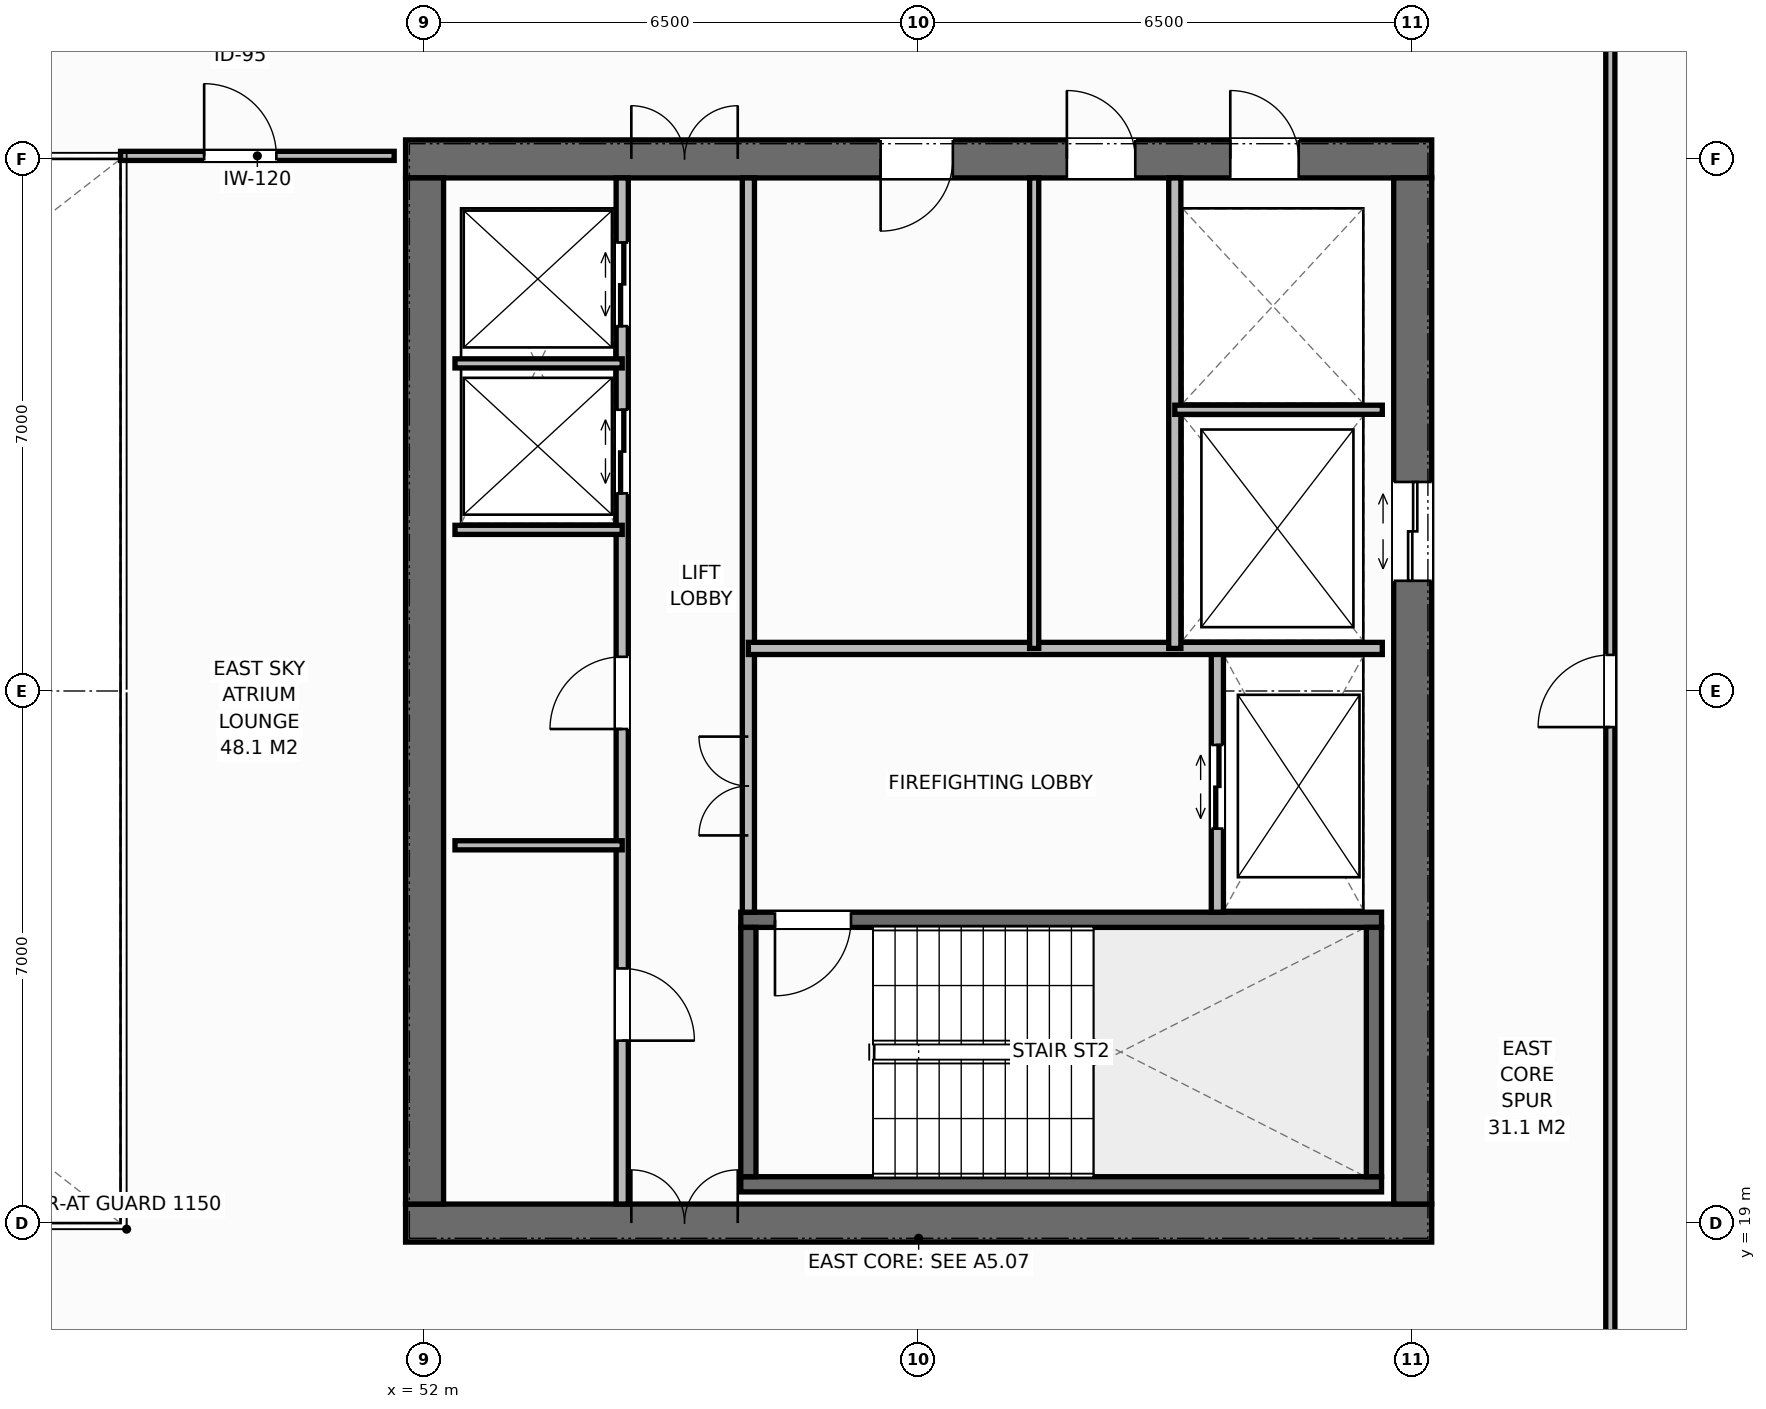
"""IFC4 building model, lengths in metres.
Left out: names, types, materials, properties, quantities, classifications, styles, units other than length and angle.
Written with IfcOpenShell. Run it as: python <this file> out.ifc"""

import sys

from ifc_helpers import new_model, si_unit, direction, frame, frame_2d, origin, place, context, subcontext, project, spatial, rectangle, extrude, element, fill, save


model = new_model("IFC4")
c1 = context("Model", 3, precision=1e-05, world=origin(), true_north=direction((0.0, 1.0)))
c2 = subcontext(c1, "Body", "Model", "MODEL_VIEW")
j1 = project(units=[si_unit("LENGTHUNIT", "METRE"), si_unit("PLANEANGLEUNIT", "RADIAN")], contexts=[c1])
p1 = place(None, origin())
s1 = spatial("IfcSite", under=j1, at=p1, CompositionType="ELEMENT")
p2 = place(p1, origin())
s2 = spatial("IfcBuilding", under=s1, at=p2, CompositionType="ELEMENT")
p3 = place(p2, frame((0.0, 0.0, 259.4)))
s3 = spatial("IfcBuildingStorey", under=s2, at=p3, CompositionType="ELEMENT", Elevation=259.4)
p4 = place(p3, frame((51.75, 19.0, 0.0), z_axis=(0.0, 0.0, 1.0), x_axis=(1.0, 0.0, 0.0)))
e1 = element("IfcWall", 1, at=p4, inside=s3, PredefinedType="SHEAR", context=c2, shape_type="SweptSolid", body=[
    extrude(rectangle(XDim=13.5, YDim=0.5, at=frame_2d((6.75, 0.0))), origin(), (0.0, 0.0, 1.0), 3.8),
])
p5 = place(p4, frame((2.97, 0.0, 0.0)))
e2 = element("IfcOpeningElement", 2, at=p5, cuts=e1, PredefinedType="OPENING", context=c2, shape_type="SweptSolid", body=[
    extrude(rectangle(XDim=1.4, YDim=2.2, at=frame_2d((0.7, 1.1))), frame((0.0, 0.26, 0.0), z_axis=(0.0, -1.0, 0.0), x_axis=(1.0, 0.0, 0.0)), (0.0, 0.0, 1.0), 0.52),
])
p6 = place(p3, frame((51.75, 33.0, 0.0), z_axis=(0.0, 0.0, 1.0), x_axis=(1.0, 0.0, 0.0)))
e3 = element("IfcWall", 3, at=p6, inside=s3, PredefinedType="SHEAR", context=c2, shape_type="SweptSolid", body=[
    extrude(rectangle(XDim=13.5, YDim=0.5, at=frame_2d((6.75, 0.0))), origin(), (0.0, 0.0, 1.0), 3.8),
])
p7 = place(p6, frame((2.97, 0.0, 0.0)))
e4 = element("IfcOpeningElement", 4, at=p7, cuts=e3, PredefinedType="OPENING", context=c2, shape_type="SweptSolid", body=[
    extrude(rectangle(XDim=1.4, YDim=2.2, at=frame_2d((0.7, 1.1))), frame((0.0, 0.26, 0.0), z_axis=(0.0, -1.0, 0.0), x_axis=(1.0, 0.0, 0.0)), (0.0, 0.0, 1.0), 0.52),
])
p8 = place(p6, frame((10.85, 0.0, 0.0)))
e5 = element("IfcOpeningElement", 5, at=p8, cuts=e3, PredefinedType="OPENING", context=c2, shape_type="SweptSolid", body=[
    extrude(rectangle(XDim=0.9, YDim=2.15, at=frame_2d((0.45, 1.075))), frame((0.0, 0.26, 0.0), z_axis=(0.0, -1.0, 0.0), x_axis=(1.0, 0.0, 0.0)), (0.0, 0.0, 1.0), 0.52),
])
p9 = place(p6, frame((6.25, 0.0, 0.0)))
e6 = element("IfcOpeningElement", 6, at=p9, cuts=e3, PredefinedType="OPENING", context=c2, shape_type="SweptSolid", body=[
    extrude(rectangle(XDim=0.95, YDim=2.15, at=frame_2d((0.475, 1.075))), frame((0.0, 0.26, 0.0), z_axis=(0.0, -1.0, 0.0), x_axis=(1.0, 0.0, 0.0)), (0.0, 0.0, 1.0), 0.52),
])
p10 = place(p6, frame((8.7, 0.0, 0.0)))
e7 = element("IfcOpeningElement", 7, at=p10, cuts=e3, PredefinedType="OPENING", context=c2, shape_type="SweptSolid", body=[
    extrude(rectangle(XDim=0.9, YDim=2.15, at=frame_2d((0.45, 1.075))), frame((0.0, 0.26, 0.0), z_axis=(0.0, -1.0, 0.0), x_axis=(1.0, 0.0, 0.0)), (0.0, 0.0, 1.0), 0.52),
])
p11 = place(p3, frame((52.0, 19.25, 0.0), z_axis=(0.0, 0.0, 1.0), x_axis=(0.0, 1.0, 0.0)))
e8 = element("IfcWall", 8, at=p11, inside=s3, PredefinedType="SHEAR", context=c2, shape_type="SweptSolid", body=[
    extrude(rectangle(XDim=13.5, YDim=0.5, at=frame_2d((6.75, 0.0))), origin(), (0.0, 0.0, 1.0), 3.8),
])
p12 = place(p3, frame((65.0, 19.25, 0.0), z_axis=(0.0, 0.0, 1.0), x_axis=(0.0, 1.0, 0.0)))
e9 = element("IfcWall", 9, at=p12, inside=s3, PredefinedType="SHEAR", context=c2, shape_type="SweptSolid", body=[
    extrude(rectangle(XDim=13.5, YDim=0.5, at=frame_2d((6.75, 0.0))), origin(), (0.0, 0.0, 1.0), 3.8),
])
p13 = place(p12, frame((8.2, 0.0, 0.0)))
e10 = element("IfcOpeningElement", 10, at=p13, cuts=e9, PredefinedType="OPENING", context=c2, shape_type="SweptSolid", body=[
    extrude(rectangle(XDim=1.3, YDim=2.2, at=frame_2d((0.65, 1.1))), frame((0.0, 0.26, 0.0), z_axis=(0.0, -1.0, 0.0), x_axis=(1.0, 0.0, 0.0)), (0.0, 0.0, 1.0), 0.52),
])
p14 = place(p3, frame((56.16, 19.51, 0.0), z_axis=(0.0, 0.0, 1.0), x_axis=(1.0, 0.0, 0.0)))
e11 = element("IfcWall", 11, at=p14, inside=s3, PredefinedType="SHEAR", context=c2, shape_type="SweptSolid", body=[
    extrude(rectangle(XDim=8.43, YDim=0.2, at=frame_2d((4.215, 0.0))), origin(), (0.0, 0.0, 1.0), 3.8),
])
p15 = place(p3, frame((56.16, 22.99, 0.0), z_axis=(0.0, 0.0, 1.0), x_axis=(1.0, 0.0, 0.0)))
e12 = element("IfcWall", 12, at=p15, inside=s3, PredefinedType="SHEAR", context=c2, shape_type="SweptSolid", body=[
    extrude(rectangle(XDim=8.43, YDim=0.2, at=frame_2d((4.215, 0.0))), origin(), (0.0, 0.0, 1.0), 3.8),
])
p16 = place(p15, frame((0.45, 0.0, 0.0)))
e13 = element("IfcOpeningElement", 13, at=p16, cuts=e12, PredefinedType="OPENING", context=c2, shape_type="SweptSolid", body=[
    extrude(rectangle(XDim=1.0, YDim=2.15, at=frame_2d((0.5, 1.075))), frame((0.0, 0.11, 0.0), z_axis=(0.0, -1.0, 0.0), x_axis=(1.0, 0.0, 0.0)), (0.0, 0.0, 1.0), 0.22),
])
for number, where, z_axis, x_axis in (
    (14, (56.26, 19.61, 0.0), (0.0, 0.0, 1.0), (0.0, 1.0, 0.0)),
    (15, (64.49, 19.61, 0.0), (0.0, 0.0, 1.0), (0.0, 1.0, 0.0)),
):
    element("IfcWall", number, at=place(p3, frame(where, z_axis=z_axis, x_axis=x_axis)), inside=s3, PredefinedType="SHEAR", context=c2, shape_type="SweptSolid", body=[
        extrude(rectangle(XDim=3.28, YDim=0.2, at=frame_2d((1.64, 0.0))), origin(), (0.0, 0.0, 1.0), 3.8),
    ])
p17 = place(p3, frame((54.6, 19.25, 0.0), z_axis=(0.0, 0.0, 1.0), x_axis=(0.0, 1.0, 0.0)))
e16 = element("IfcWall", 16, at=p17, inside=s3, PredefinedType="STANDARD", context=c2, shape_type="SweptSolid", body=[
    extrude(rectangle(XDim=13.5, YDim=0.16, at=frame_2d((6.75, 0.0))), origin(), (0.0, 0.0, 1.0), 3.588),
])
p18 = place(p17, frame((2.15, 0.0, 0.0)))
e17 = element("IfcOpeningElement", 17, at=p18, cuts=e16, PredefinedType="OPENING", context=c2, shape_type="SweptSolid", body=[
    extrude(rectangle(XDim=0.95, YDim=2.15, at=frame_2d((0.475, 1.075))), frame((0.0, 0.09, 0.0), z_axis=(0.0, -1.0, 0.0), x_axis=(1.0, 0.0, 0.0)), (0.0, 0.0, 1.0), 0.18),
])
p19 = place(p17, frame((6.25, 0.0, 0.0)))
e18 = element("IfcOpeningElement", 18, at=p19, cuts=e16, PredefinedType="OPENING", context=c2, shape_type="SweptSolid", body=[
    extrude(rectangle(XDim=0.95, YDim=2.15, at=frame_2d((0.475, 1.075))), frame((0.0, 0.09, 0.0), z_axis=(0.0, -1.0, 0.0), x_axis=(1.0, 0.0, 0.0)), (0.0, 0.0, 1.0), 0.18),
])
p20 = place(p17, frame((9.35, 0.0, 0.0)))
e19 = element("IfcOpeningElement", 19, at=p20, cuts=e16, PredefinedType="OPENING", context=c2, shape_type="SweptSolid", body=[
    extrude(rectangle(XDim=1.1, YDim=2.2, at=frame_2d((0.55, 1.1))), frame((0.0, 0.09, 0.0), z_axis=(0.0, -1.0, 0.0), x_axis=(1.0, 0.0, 0.0)), (0.0, 0.0, 1.0), 0.18),
])
p21 = place(p17, frame((11.55, 0.0, 0.0)))
e20 = element("IfcOpeningElement", 20, at=p21, cuts=e16, PredefinedType="OPENING", context=c2, shape_type="SweptSolid", body=[
    extrude(rectangle(XDim=1.1, YDim=2.2, at=frame_2d((0.55, 1.1))), frame((0.0, 0.09, 0.0), z_axis=(0.0, -1.0, 0.0), x_axis=(1.0, 0.0, 0.0)), (0.0, 0.0, 1.0), 0.18),
])
p22 = place(p3, frame((56.26, 23.09, 0.0), z_axis=(0.0, 0.0, 1.0), x_axis=(0.0, 1.0, 0.0)))
e21 = element("IfcWall", 21, at=p22, inside=s3, PredefinedType="STANDARD", context=c2, shape_type="SweptSolid", body=[
    extrude(rectangle(XDim=9.66, YDim=0.16, at=frame_2d((4.83, 0.0))), origin(), (0.0, 0.0, 1.0), 3.588),
])
p23 = place(p22, frame((1.01, 0.0, 0.0)))
e22 = element("IfcOpeningElement", 22, at=p23, cuts=e21, PredefinedType="OPENING", context=c2, shape_type="SweptSolid", body=[
    extrude(rectangle(XDim=1.3, YDim=2.2, at=frame_2d((0.65, 1.1))), frame((0.0, 0.09, 0.0), z_axis=(0.0, -1.0, 0.0), x_axis=(1.0, 0.0, 0.0)), (0.0, 0.0, 1.0), 0.18),
])
for number, where, z_axis, x_axis in (
    (23, (52.4, 23.97, 0.0), (0.0, 0.0, 1.0), (1.0, 0.0, 0.0)),
    (24, (52.4, 28.12, 0.0), (0.0, 0.0, 1.0), (1.0, 0.0, 0.0)),
    (25, (52.4, 30.31, 0.0), (0.0, 0.0, 1.0), (1.0, 0.0, 0.0)),
):
    element("IfcWall", number, at=place(p3, frame(where, z_axis=z_axis, x_axis=x_axis)), inside=s3, PredefinedType="PARTITIONING", context=c2, shape_type="SweptSolid", body=[
        extrude(rectangle(XDim=2.2, YDim=0.12, at=frame_2d((1.1, 0.0))), origin(), (0.0, 0.0, 1.0), 3.588),
    ])
p24 = place(p3, frame((62.43, 23.09, 0.0), z_axis=(0.0, 0.0, 1.0), x_axis=(0.0, 1.0, 0.0)))
e26 = element("IfcWall", 26, at=p24, inside=s3, PredefinedType="STANDARD", context=c2, shape_type="SweptSolid", body=[
    extrude(rectangle(XDim=3.47, YDim=0.16, at=frame_2d((1.735, 0.0))), origin(), (0.0, 0.0, 1.0), 3.588),
])
p25 = place(p24, frame((1.1, 0.0, 0.0)))
e27 = element("IfcOpeningElement", 27, at=p25, cuts=e26, PredefinedType="OPENING", context=c2, shape_type="SweptSolid", body=[
    extrude(rectangle(XDim=1.1, YDim=2.2, at=frame_2d((0.55, 1.1))), frame((0.0, 0.09, 0.0), z_axis=(0.0, -1.0, 0.0), x_axis=(1.0, 0.0, 0.0)), (0.0, 0.0, 1.0), 0.18),
])
p26 = place(p3, frame((56.26, 26.56, 0.0), z_axis=(0.0, 0.0, 1.0), x_axis=(1.0, 0.0, 0.0)))
e28 = element("IfcWall", 28, at=p26, inside=s3, PredefinedType="STANDARD", context=c2, shape_type="SweptSolid", body=[
    extrude(rectangle(XDim=8.34, YDim=0.16, at=frame_2d((4.17, 0.0))), origin(), (0.0, 0.0, 1.0), 3.588),
])
p27 = place(p3, frame((61.87, 26.56, 0.0), z_axis=(0.0, 0.0, 1.0), x_axis=(0.0, 1.0, 0.0)))
e29 = element("IfcWall", 29, at=p27, inside=s3, PredefinedType="STANDARD", context=c2, shape_type="SweptSolid", body=[
    extrude(rectangle(XDim=6.19, YDim=0.16, at=frame_2d((3.095, 0.0))), origin(), (0.0, 0.0, 1.0), 3.588),
])
p28 = place(p3, frame((61.87, 29.7, 0.0), z_axis=(0.0, 0.0, 1.0), x_axis=(1.0, 0.0, 0.0)))
e30 = element("IfcWall", 30, at=p28, inside=s3, PredefinedType="PARTITIONING", context=c2, shape_type="SweptSolid", body=[
    extrude(rectangle(XDim=2.73, YDim=0.12, at=frame_2d((1.365, 0.0))), origin(), (0.0, 0.0, 1.0), 3.588),
])
p29 = place(p3, frame((60.02, 26.56, 0.0), z_axis=(0.0, 0.0, 1.0), x_axis=(0.0, 1.0, 0.0)))
e31 = element("IfcWall", 31, at=p29, inside=s3, PredefinedType="PARTITIONING", context=c2, shape_type="SweptSolid", body=[
    extrude(rectangle(XDim=6.19, YDim=0.12, at=frame_2d((3.095, 0.0))), origin(), (0.0, 0.0, 1.0), 3.588),
])
p30 = place(p3, frame((48.0, 33.04, 0.0), z_axis=(0.0, 0.0, 1.0), x_axis=(1.0, 0.0, 0.0)))
e32 = element("IfcWall", 32, at=p30, inside=s3, PredefinedType="PARTITIONING", context=c2, shape_type="SweptSolid", body=[
    extrude(rectangle(XDim=3.6, YDim=0.12, at=frame_2d((1.8, 0.0))), origin(), (0.0, 0.0, 1.0), 3.328),
])
p31 = place(p30, frame((1.1, 0.0, 0.0)))
e33 = element("IfcOpeningElement", 33, at=p31, cuts=e32, PredefinedType="OPENING", context=c2, shape_type="SweptSolid", body=[
    extrude(rectangle(XDim=0.95, YDim=2.15, at=frame_2d((0.475, 1.075))), frame((0.0, 0.07, 0.0), z_axis=(0.0, -1.0, 0.0), x_axis=(1.0, 0.0, 0.0)), (0.0, 0.0, 1.0), 0.14),
])
p32 = place(p3, frame((67.6, 16.5, 0.0), z_axis=(0.0, 0.0, 1.0), x_axis=(0.0, 1.0, 0.0)))
e34 = element("IfcWall", 34, at=p32, inside=s3, PredefinedType="PARTITIONING", context=c2, shape_type="SweptSolid", body=[
    extrude(rectangle(XDim=19.0, YDim=0.12, at=frame_2d((9.5, 0.0))), origin(), (0.0, 0.0, 1.0), 3.588),
])
p33 = place(p32, frame((9.025, 0.0, 0.0)))
e35 = element("IfcOpeningElement", 35, at=p33, cuts=e34, PredefinedType="OPENING", context=c2, shape_type="SweptSolid", body=[
    extrude(rectangle(XDim=0.95, YDim=2.15, at=frame_2d((0.475, 1.075))), frame((0.0, 0.07, 0.0), z_axis=(0.0, -1.0, 0.0), x_axis=(1.0, 0.0, 0.0)), (0.0, 0.0, 1.0), 0.14),
])
p34 = place(p5, origin())
e36 = element("IfcDoor", 36, at=p34, inside=s3, OperationType="DOUBLE_DOOR_SINGLE_SWING", PredefinedType="DOOR", context=c2, shape_type="SweptSolid", body=[
    extrude(rectangle(XDim=1.4, YDim=2.2, at=frame_2d((0.7, 1.1))), frame((0.0, 0.075, 0.0), z_axis=(0.0, -1.0, 0.0), x_axis=(1.0, 0.0, 0.0)), (0.0, 0.0, 1.0), 0.05),
])
fill(e2, e36)
p35 = place(p7, origin())
e37 = element("IfcDoor", 37, at=p35, inside=s3, OperationType="DOUBLE_DOOR_SINGLE_SWING", PredefinedType="DOOR", context=c2, shape_type="SweptSolid", body=[
    extrude(rectangle(XDim=1.4, YDim=2.2, at=frame_2d((0.7, 1.1))), frame((0.0, -0.025, 0.0), z_axis=(0.0, -1.0, 0.0), x_axis=(1.0, 0.0, 0.0)), (0.0, 0.0, 1.0), 0.05),
])
fill(e4, e37)
p36 = place(p18, origin())
e38 = element("IfcDoor", 38, at=p36, inside=s3, OperationType="SINGLE_SWING_RIGHT", PredefinedType="DOOR", context=c2, shape_type="SweptSolid", body=[
    extrude(rectangle(XDim=0.95, YDim=2.15, at=frame_2d((0.475, 1.075))), frame((0.0, 0.025, 0.0), z_axis=(0.0, -1.0, 0.0), x_axis=(1.0, 0.0, 0.0)), (0.0, 0.0, 1.0), 0.05),
])
fill(e17, e38)
p37 = place(p19, origin())
e39 = element("IfcDoor", 39, at=p37, inside=s3, OperationType="SINGLE_SWING_LEFT", PredefinedType="DOOR", context=c2, shape_type="SweptSolid", body=[
    extrude(rectangle(XDim=0.95, YDim=2.15, at=frame_2d((0.475, 1.075))), frame((0.0, 0.025, 0.0), z_axis=(0.0, -1.0, 0.0), x_axis=(1.0, 0.0, 0.0)), (0.0, 0.0, 1.0), 0.05),
])
fill(e18, e39)
p38 = place(p20, origin())
e40 = element("IfcDoor", 40, at=p38, inside=s3, OperationType="DOUBLE_DOOR_SLIDING", PredefinedType="DOOR", context=c2, shape_type="SweptSolid", body=[
    extrude(rectangle(XDim=1.1, YDim=2.2, at=frame_2d((0.55, 1.1))), frame((0.0, 0.025, 0.0), z_axis=(0.0, -1.0, 0.0), x_axis=(1.0, 0.0, 0.0)), (0.0, 0.0, 1.0), 0.05),
])
fill(e19, e40)
p39 = place(p21, origin())
e41 = element("IfcDoor", 41, at=p39, inside=s3, OperationType="DOUBLE_DOOR_SLIDING", PredefinedType="DOOR", context=c2, shape_type="SweptSolid", body=[
    extrude(rectangle(XDim=1.1, YDim=2.2, at=frame_2d((0.55, 1.1))), frame((0.0, 0.025, 0.0), z_axis=(0.0, -1.0, 0.0), x_axis=(1.0, 0.0, 0.0)), (0.0, 0.0, 1.0), 0.05),
])
fill(e20, e41)
p40 = place(p16, origin())
e42 = element("IfcDoor", 42, at=p40, inside=s3, OperationType="SINGLE_SWING_RIGHT", PredefinedType="DOOR", context=c2, shape_type="SweptSolid", body=[
    extrude(rectangle(XDim=1.0, YDim=2.15, at=frame_2d((0.5, 1.075))), frame((0.0, 0.025, 0.0), z_axis=(0.0, -1.0, 0.0), x_axis=(1.0, 0.0, 0.0)), (0.0, 0.0, 1.0), 0.05),
])
fill(e13, e42)
p41 = place(p25, origin())
e43 = element("IfcDoor", 43, at=p41, inside=s3, OperationType="DOUBLE_DOOR_SLIDING", PredefinedType="DOOR", context=c2, shape_type="SweptSolid", body=[
    extrude(rectangle(XDim=1.1, YDim=2.2, at=frame_2d((0.55, 1.1))), frame((0.0, 0.025, 0.0), z_axis=(0.0, -1.0, 0.0), x_axis=(1.0, 0.0, 0.0)), (0.0, 0.0, 1.0), 0.05),
])
fill(e27, e43)
p42 = place(p23, origin())
e44 = element("IfcDoor", 44, at=p42, inside=s3, OperationType="DOUBLE_DOOR_SINGLE_SWING", PredefinedType="DOOR", context=c2, shape_type="SweptSolid", body=[
    extrude(rectangle(XDim=1.3, YDim=2.2, at=frame_2d((0.65, 1.1))), frame((0.0, 0.025, 0.0), z_axis=(0.0, -1.0, 0.0), x_axis=(1.0, 0.0, 0.0)), (0.0, 0.0, 1.0), 0.05),
])
fill(e22, e44)
p43 = place(p13, origin())
e45 = element("IfcDoor", 45, at=p43, inside=s3, OperationType="DOUBLE_DOOR_SLIDING", PredefinedType="DOOR", context=c2, shape_type="SweptSolid", body=[
    extrude(rectangle(XDim=1.3, YDim=2.2, at=frame_2d((0.65, 1.1))), frame((0.0, 0.025, 0.0), z_axis=(0.0, -1.0, 0.0), x_axis=(1.0, 0.0, 0.0)), (0.0, 0.0, 1.0), 0.05),
])
fill(e10, e45)
p44 = place(p8, origin())
e46 = element("IfcDoor", 46, at=p44, inside=s3, OperationType="SINGLE_SWING_LEFT", PredefinedType="DOOR", context=c2, shape_type="SweptSolid", body=[
    extrude(rectangle(XDim=0.9, YDim=2.15, at=frame_2d((0.45, 1.075))), frame((0.0, -0.025, 0.0), z_axis=(0.0, -1.0, 0.0), x_axis=(1.0, 0.0, 0.0)), (0.0, 0.0, 1.0), 0.05),
])
fill(e5, e46)
p45 = place(p9, origin())
e47 = element("IfcDoor", 47, at=p45, inside=s3, OperationType="SINGLE_SWING_RIGHT", PredefinedType="DOOR", context=c2, shape_type="SweptSolid", body=[
    extrude(rectangle(XDim=0.95, YDim=2.15, at=frame_2d((0.475, 1.075))), frame((0.0, -0.025, 0.0), z_axis=(0.0, -1.0, 0.0), x_axis=(1.0, 0.0, 0.0)), (0.0, 0.0, 1.0), 0.05),
])
fill(e6, e47)
p46 = place(p10, origin())
e48 = element("IfcDoor", 48, at=p46, inside=s3, OperationType="SINGLE_SWING_LEFT", PredefinedType="DOOR", context=c2, shape_type="SweptSolid", body=[
    extrude(rectangle(XDim=0.9, YDim=2.15, at=frame_2d((0.45, 1.075))), frame((0.0, -0.025, 0.0), z_axis=(0.0, -1.0, 0.0), x_axis=(1.0, 0.0, 0.0)), (0.0, 0.0, 1.0), 0.05),
])
fill(e7, e48)
p47 = place(p31, origin())
e49 = element("IfcDoor", 49, at=p47, inside=s3, OperationType="SINGLE_SWING_LEFT", PredefinedType="DOOR", context=c2, shape_type="SweptSolid", body=[
    extrude(rectangle(XDim=0.95, YDim=2.15, at=frame_2d((0.475, 1.075))), frame((0.0, 0.025, 0.0), z_axis=(0.0, -1.0, 0.0), x_axis=(1.0, 0.0, 0.0)), (0.0, 0.0, 1.0), 0.05),
])
fill(e33, e49)
p48 = place(p33, origin())
e50 = element("IfcDoor", 50, at=p48, inside=s3, OperationType="SINGLE_SWING_LEFT", PredefinedType="DOOR", context=c2, shape_type="SweptSolid", body=[
    extrude(rectangle(XDim=0.95, YDim=2.15, at=frame_2d((0.475, 1.075))), frame((0.0, 0.025, 0.0), z_axis=(0.0, -1.0, 0.0), x_axis=(1.0, 0.0, 0.0)), (0.0, 0.0, 1.0), 0.05),
])
fill(e35, e50)
save(model, sys.argv[1])
